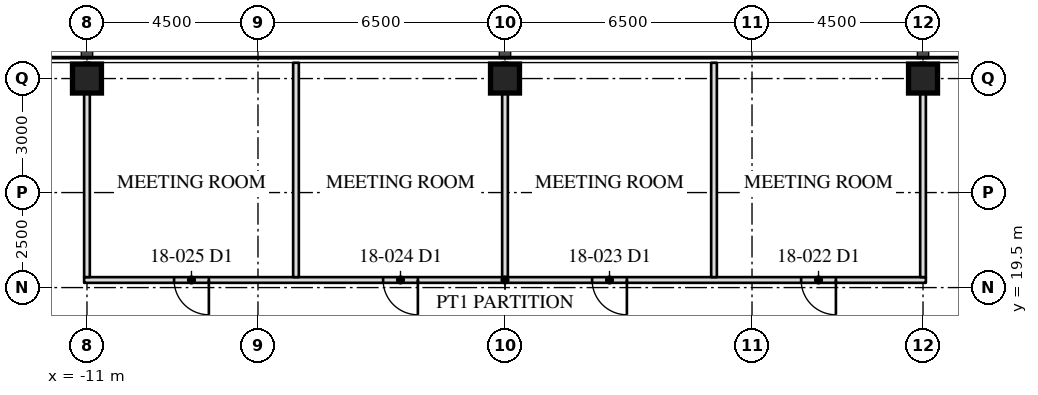
"""IFC4 building model, lengths in metres.
Left out: names, types, materials, properties, quantities, classifications, styles, units other than length and angle.
Written with IfcOpenShell. Run it as: python <this file> out.ifc"""

import sys

from ifc_helpers import new_model, si_unit, direction, frame, frame_2d, origin, origin_2d, place, context, subcontext, project, spatial, rectangle, hollow_rectangle, extrude, element, fill, save


model = new_model("IFC4")
c1 = context("Model", 3, precision=1e-05, world=origin(), true_north=direction((0.0, 1.0)))
c2 = subcontext(c1, "Body", "Model", "MODEL_VIEW")
j1 = project(units=[si_unit("LENGTHUNIT", "METRE"), si_unit("PLANEANGLEUNIT", "RADIAN")], contexts=[c1])
p1 = place(None, origin())
s1 = spatial("IfcSite", under=j1, at=p1, CompositionType="ELEMENT")
p2 = place(p1, origin())
s2 = spatial("IfcBuilding", under=s1, at=p2, CompositionType="ELEMENT")
p3 = place(p2, frame((0.0, 0.0, 77.5)))
s3 = spatial("IfcBuildingStorey", under=s2, at=p3, CompositionType="ELEMENT", Elevation=77.5)
for number, where, z_axis, x_axis in (
    (1, (11.0, 25.0, 0.0), (0.0, 0.0, 1.0), (1.0, 0.0, 0.0)),
    (2, (0.0, 25.0, 0.0), (0.0, 0.0, 1.0), (1.0, 0.0, 0.0)),
    (3, (-11.0, 25.0, 0.0), (0.0, 0.0, 1.0), (1.0, 0.0, 0.0)),
):
    element("IfcColumn", number, at=place(p3, frame(where, z_axis=z_axis, x_axis=x_axis)), inside=s3, PredefinedType="COLUMN", context=c2, shape_type="SweptSolid", body=[
        extrude(hollow_rectangle(XDim=0.762, YDim=0.762, WallThickness=0.127, at=origin_2d()), origin(), (0.0, 0.0, 1.0), 4.1),
    ])
p4 = place(p3, frame((11.075, 19.7, 0.0), z_axis=(0.0, 0.0, 1.0), x_axis=(-1.0, 0.0, 0.0)))
e4 = element("IfcWall", 4, at=p4, inside=s3, PredefinedType="PARTITIONING", context=c2, shape_type="SweptSolid", body=[
    extrude(rectangle(XDim=22.15, YDim=0.15, at=frame_2d((11.075, 0.0))), origin(), (0.0, 0.0, 1.0), 3.91),
])
p5 = place(p4, frame((2.367, 0.0, 0.0)))
e5 = element("IfcOpeningElement", 5, at=p5, cuts=e4, PredefinedType="OPENING", context=c2, shape_type="SweptSolid", body=[
    extrude(rectangle(XDim=0.915, YDim=2.134, at=frame_2d((0.458, 1.067))), frame((0.0, 0.085, 0.0), z_axis=(0.0, -1.0, 0.0), x_axis=(1.0, 0.0, 0.0)), (0.0, 0.0, 1.0), 0.17),
])
p6 = place(p4, frame((7.867, 0.0, 0.0)))
e6 = element("IfcOpeningElement", 6, at=p6, cuts=e4, PredefinedType="OPENING", context=c2, shape_type="SweptSolid", body=[
    extrude(rectangle(XDim=0.915, YDim=2.134, at=frame_2d((0.458, 1.067))), frame((0.0, 0.085, 0.0), z_axis=(0.0, -1.0, 0.0), x_axis=(1.0, 0.0, 0.0)), (0.0, 0.0, 1.0), 0.17),
])
p7 = place(p4, frame((13.367, 0.0, 0.0)))
e7 = element("IfcOpeningElement", 7, at=p7, cuts=e4, PredefinedType="OPENING", context=c2, shape_type="SweptSolid", body=[
    extrude(rectangle(XDim=0.915, YDim=2.134, at=frame_2d((0.458, 1.067))), frame((0.0, 0.085, 0.0), z_axis=(0.0, -1.0, 0.0), x_axis=(1.0, 0.0, 0.0)), (0.0, 0.0, 1.0), 0.17),
])
p8 = place(p4, frame((18.867, 0.0, 0.0)))
e8 = element("IfcOpeningElement", 8, at=p8, cuts=e4, PredefinedType="OPENING", context=c2, shape_type="SweptSolid", body=[
    extrude(rectangle(XDim=0.915, YDim=2.134, at=frame_2d((0.458, 1.067))), frame((0.0, 0.085, 0.0), z_axis=(0.0, -1.0, 0.0), x_axis=(1.0, 0.0, 0.0)), (0.0, 0.0, 1.0), 0.17),
])
p9 = place(p3, frame((11.0, 19.775, 0.0), z_axis=(0.0, 0.0, 1.0), x_axis=(0.0, 1.0, 0.0)))
e9 = element("IfcWall", 9, at=p9, inside=s3, PredefinedType="PARTITIONING", context=c2, shape_type="SweptSolid", body=[
    extrude(rectangle(XDim=5.64, YDim=0.15, at=frame_2d((2.82, 0.0))), origin(), (0.0, 0.0, 1.0), 3.13),
])
p10 = place(p3, frame((5.5, 19.775, 0.0), z_axis=(0.0, 0.0, 1.0), x_axis=(0.0, 1.0, 0.0)))
e10 = element("IfcWall", 10, at=p10, inside=s3, PredefinedType="PARTITIONING", context=c2, shape_type="SweptSolid", body=[
    extrude(rectangle(XDim=5.64, YDim=0.15, at=frame_2d((2.82, 0.0))), origin(), (0.0, 0.0, 1.0), 3.91),
])
p11 = place(p3, frame((0.0, 19.775, 0.0), z_axis=(0.0, 0.0, 1.0), x_axis=(0.0, 1.0, 0.0)))
e11 = element("IfcWall", 11, at=p11, inside=s3, PredefinedType="PARTITIONING", context=c2, shape_type="SweptSolid", body=[
    extrude(rectangle(XDim=5.64, YDim=0.15, at=frame_2d((2.82, 0.0))), origin(), (0.0, 0.0, 1.0), 3.13),
])
p12 = place(p3, frame((-5.5, 19.775, 0.0), z_axis=(0.0, 0.0, 1.0), x_axis=(0.0, 1.0, 0.0)))
e12 = element("IfcWall", 12, at=p12, inside=s3, PredefinedType="PARTITIONING", context=c2, shape_type="SweptSolid", body=[
    extrude(rectangle(XDim=5.64, YDim=0.15, at=frame_2d((2.82, 0.0))), origin(), (0.0, 0.0, 1.0), 3.91),
])
p13 = place(p3, frame((-11.0, 19.775, 0.0), z_axis=(0.0, 0.0, 1.0), x_axis=(0.0, 1.0, 0.0)))
e13 = element("IfcWall", 13, at=p13, inside=s3, PredefinedType="PARTITIONING", context=c2, shape_type="SweptSolid", body=[
    extrude(rectangle(XDim=5.64, YDim=0.15, at=frame_2d((2.82, 0.0))), origin(), (0.0, 0.0, 1.0), 3.13),
])
p14 = place(p5, origin())
e14 = element("IfcDoor", 14, at=p14, inside=s3, OperationType="SINGLE_SWING_LEFT", PredefinedType="DOOR", context=c2, shape_type="SweptSolid", body=[
    extrude(rectangle(XDim=0.915, YDim=2.134, at=frame_2d((0.458, 1.067))), frame((0.0, 0.025, 0.0), z_axis=(0.0, -1.0, 0.0), x_axis=(1.0, 0.0, 0.0)), (0.0, 0.0, 1.0), 0.05),
])
fill(e5, e14)
p15 = place(p6, origin())
e15 = element("IfcDoor", 15, at=p15, inside=s3, OperationType="SINGLE_SWING_LEFT", PredefinedType="DOOR", context=c2, shape_type="SweptSolid", body=[
    extrude(rectangle(XDim=0.915, YDim=2.134, at=frame_2d((0.458, 1.067))), frame((0.0, 0.025, 0.0), z_axis=(0.0, -1.0, 0.0), x_axis=(1.0, 0.0, 0.0)), (0.0, 0.0, 1.0), 0.05),
])
fill(e6, e15)
p16 = place(p7, origin())
e16 = element("IfcDoor", 16, at=p16, inside=s3, OperationType="SINGLE_SWING_LEFT", PredefinedType="DOOR", context=c2, shape_type="SweptSolid", body=[
    extrude(rectangle(XDim=0.915, YDim=2.134, at=frame_2d((0.458, 1.067))), frame((0.0, 0.025, 0.0), z_axis=(0.0, -1.0, 0.0), x_axis=(1.0, 0.0, 0.0)), (0.0, 0.0, 1.0), 0.05),
])
fill(e7, e16)
p17 = place(p8, origin())
e17 = element("IfcDoor", 17, at=p17, inside=s3, OperationType="SINGLE_SWING_LEFT", PredefinedType="DOOR", context=c2, shape_type="SweptSolid", body=[
    extrude(rectangle(XDim=0.915, YDim=2.134, at=frame_2d((0.458, 1.067))), frame((0.0, 0.025, 0.0), z_axis=(0.0, -1.0, 0.0), x_axis=(1.0, 0.0, 0.0)), (0.0, 0.0, 1.0), 0.05),
])
fill(e8, e17)
save(model, sys.argv[1])
